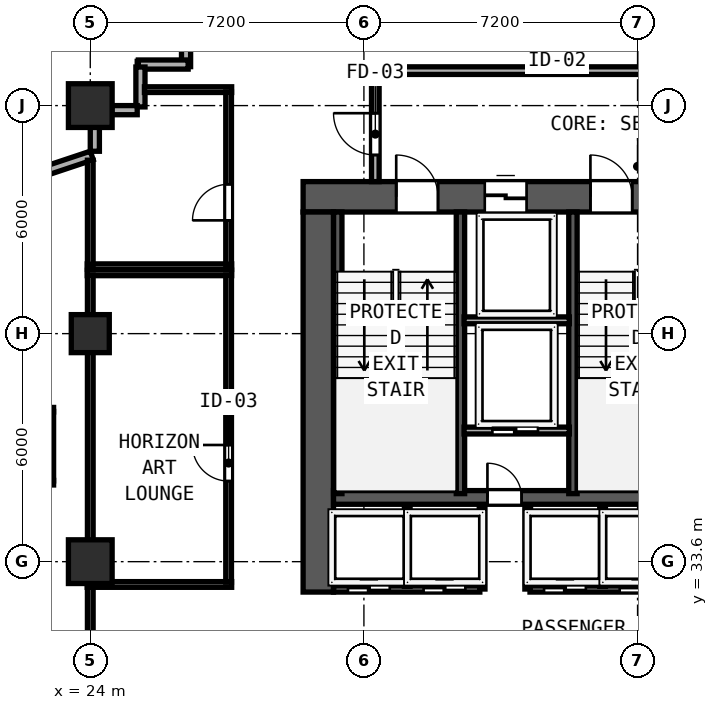
"""IFC4 building model, lengths in metres.
Left out: names, types, materials, properties, quantities, classifications, styles, units other than length and angle.
Written with IfcOpenShell. Run it as: python <this file> out.ifc"""

import sys

from ifc_helpers import new_model, si_unit, direction, frame, frame_2d, origin, origin_2d, place, context, subcontext, project, spatial, rectangle, hollow_rectangle, extrude, element, fill, save


model = new_model("IFC4")
c1 = context("Model", 3, precision=1e-05, world=origin(), true_north=direction((0.0, 1.0)))
c2 = subcontext(c1, "Body", "Model", "MODEL_VIEW")
j1 = project(units=[si_unit("LENGTHUNIT", "METRE"), si_unit("PLANEANGLEUNIT", "RADIAN")], contexts=[c1])
p1 = place(None, origin())
s1 = spatial("IfcSite", under=j1, at=p1, CompositionType="ELEMENT")
p2 = place(p1, origin())
s2 = spatial("IfcBuilding", under=s1, at=p2, CompositionType="ELEMENT")
p3 = place(p2, frame((0.0, 0.0, 47.6)))
s3 = spatial("IfcBuildingStorey", under=s2, at=p3, CompositionType="ELEMENT", Elevation=47.6)
p4 = place(p3, frame((29.6, 43.2, 0.0), z_axis=(0.0, 0.0, 1.0), x_axis=(1.0, 0.0, 0.0)))
e1 = element("IfcWall", 1, at=p4, inside=s3, PredefinedType="SHEAR", context=c2, shape_type="SweptSolid", body=[
    extrude(rectangle(XDim=17.6, YDim=0.8, at=frame_2d((8.8, 0.0))), origin(), (0.0, 0.0, 1.0), 3.6),
])
p5 = place(p4, frame((2.45, 0.0, 0.0)))
e2 = element("IfcOpeningElement", 2, at=p5, cuts=e1, PredefinedType="OPENING", context=c2, shape_type="SweptSolid", body=[
    extrude(rectangle(XDim=1.1, YDim=2.15, at=frame_2d((0.55, 1.075))), frame((0.0, 0.41, 0.0), z_axis=(0.0, -1.0, 0.0), x_axis=(1.0, 0.0, 0.0)), (0.0, 0.0, 1.0), 0.82),
])
p6 = place(p4, frame((7.56, 0.0, 0.0)))
e3 = element("IfcOpeningElement", 3, at=p6, cuts=e1, PredefinedType="OPENING", context=c2, shape_type="SweptSolid", body=[
    extrude(rectangle(XDim=1.1, YDim=2.15, at=frame_2d((0.55, 1.075))), frame((0.0, 0.41, 0.0), z_axis=(0.0, -1.0, 0.0), x_axis=(1.0, 0.0, 0.0)), (0.0, 0.0, 1.0), 0.82),
])
p7 = place(p4, frame((13.65, 0.0, 0.0)))
e4 = element("IfcOpeningElement", 4, at=p7, cuts=e1, PredefinedType="OPENING", context=c2, shape_type="SweptSolid", body=[
    extrude(rectangle(XDim=1.1, YDim=2.15, at=frame_2d((0.55, 1.075))), frame((0.0, 0.41, 0.0), z_axis=(0.0, -1.0, 0.0), x_axis=(1.0, 0.0, 0.0)), (0.0, 0.0, 1.0), 0.82),
])
p8 = place(p4, frame((4.78, 0.0, 0.0)))
e5 = element("IfcOpeningElement", 5, at=p8, cuts=e1, PredefinedType="OPENING", context=c2, shape_type="SweptSolid", body=[
    extrude(rectangle(XDim=1.1, YDim=2.2, at=frame_2d((0.55, 1.1))), frame((0.0, 0.41, 0.0), z_axis=(0.0, -1.0, 0.0), x_axis=(1.0, 0.0, 0.0)), (0.0, 0.0, 1.0), 0.82),
])
p9 = place(p4, frame((11.14, 0.0, 0.0)))
e6 = element("IfcOpeningElement", 6, at=p9, cuts=e1, PredefinedType="OPENING", context=c2, shape_type="SweptSolid", body=[
    extrude(rectangle(XDim=1.1, YDim=2.2, at=frame_2d((0.55, 1.1))), frame((0.0, 0.41, 0.0), z_axis=(0.0, -1.0, 0.0), x_axis=(1.0, 0.0, 0.0)), (0.0, 0.0, 1.0), 0.82),
])
p10 = place(p3, frame((30.0, 32.8, 0.0), z_axis=(0.0, 0.0, 1.0), x_axis=(0.0, 1.0, 0.0)))
e7 = element("IfcWall", 7, at=p10, inside=s3, PredefinedType="SHEAR", context=c2, shape_type="SweptSolid", body=[
    extrude(rectangle(XDim=10.0, YDim=0.8, at=frame_2d((5.0, 0.0))), origin(), (0.0, 0.0, 1.0), 3.6),
])
p11 = place(p3, frame((30.4, 35.29, 0.0), z_axis=(0.0, 0.0, 1.0), x_axis=(1.0, 0.0, 0.0)))
e8 = element("IfcWall", 8, at=p11, inside=s3, PredefinedType="SHEAR", context=c2, shape_type="SweptSolid", body=[
    extrude(rectangle(XDim=16.0, YDim=0.36, at=frame_2d((8.0, 0.0))), origin(), (0.0, 0.0, 1.0), 3.6),
])
p12 = place(p11, frame((4.95, 0.0, 0.0), z_axis=(0.0, 0.0, 1.0), x_axis=(-1.0, 0.0, 0.0)))
e9 = element("IfcOpeningElement", 9, at=p12, cuts=e8, PredefinedType="OPENING", context=c2, shape_type="SweptSolid", body=[
    extrude(rectangle(XDim=0.9, YDim=2.1, at=frame_2d((0.45, 1.05))), frame((0.0, 0.19, 0.0), z_axis=(0.0, -1.0, 0.0), x_axis=(1.0, 0.0, 0.0)), (0.0, 0.0, 1.0), 0.38),
])
p13 = place(p11, frame((12.01, 0.0, 0.0), z_axis=(0.0, 0.0, 1.0), x_axis=(-1.0, 0.0, 0.0)))
e10 = element("IfcOpeningElement", 10, at=p13, cuts=e8, PredefinedType="OPENING", context=c2, shape_type="SweptSolid", body=[
    extrude(rectangle(XDim=0.9, YDim=2.1, at=frame_2d((0.45, 1.05))), frame((0.0, 0.19, 0.0), z_axis=(0.0, -1.0, 0.0), x_axis=(1.0, 0.0, 0.0)), (0.0, 0.0, 1.0), 0.38),
])
for number, where, z_axis, x_axis in (
    (11, (30.512, 35.39, 0.0), (0.0, 0.0, 1.0), (0.0, 1.0, 0.0)),
    (12, (33.74, 35.39, 0.0), (0.0, 0.0, 1.0), (0.0, 1.0, 0.0)),
    (13, (36.7, 35.39, 0.0), (0.0, 0.0, 1.0), (0.0, 1.0, 0.0)),
):
    element("IfcWall", number, at=place(p3, frame(where, z_axis=z_axis, x_axis=x_axis)), inside=s3, PredefinedType="SHEAR", context=c2, shape_type="SweptSolid", body=[
        extrude(rectangle(XDim=7.41, YDim=0.22, at=frame_2d((3.705, 0.0))), origin(), (0.0, 0.0, 1.0), 3.6),
    ])
for number, where, z_axis, x_axis in (
    (14, (24.0, 33.6, 0.0), (0.0, 0.0, 1.0), (1.0, 0.0, 0.0)),
    (15, (24.0, 45.6, 0.0), (0.0, 0.0, 1.0), (1.0, 0.0, 0.0)),
):
    element("IfcColumn", number, at=place(p3, frame(where, z_axis=z_axis, x_axis=x_axis)), inside=s3, PredefinedType="COLUMN", context=c2, shape_type="SweptSolid", body=[
        extrude(hollow_rectangle(XDim=1.15, YDim=1.15, WallThickness=0.042, at=origin_2d()), origin(), (0.0, 0.0, 1.0), 3.8),
    ])
p14 = place(p3, frame((24.0, 39.6, 0.0), z_axis=(0.0, 0.0, 1.0), x_axis=(1.0, 0.0, 0.0)))
e16 = element("IfcColumn", 16, at=p14, inside=s3, PredefinedType="COLUMN", context=c2, shape_type="SweptSolid", body=[
    extrude(hollow_rectangle(XDim=1.0, YDim=1.0, WallThickness=0.038, at=origin_2d()), origin(), (0.0, 0.0, 1.0), 3.8),
])
p15 = place(p3, frame((26.52, 47.995, 0.0), z_axis=(0.0, 0.0, 1.0), x_axis=(0.0, -1.0, 0.0)))
e17 = element("IfcWall", 17, at=p15, inside=s3, PredefinedType="SOLIDWALL", context=c2, shape_type="SweptSolid", body=[
    extrude(rectangle(XDim=1.37, YDim=0.24, at=frame_2d((0.685, 0.0))), origin(), (0.0, 0.0, 1.0), 3.6),
])
p16 = place(p3, frame((26.575, 46.68, 0.0), z_axis=(0.0, 0.0, 1.0), x_axis=(-1.0, 0.0, 0.0)))
e18 = element("IfcWall", 18, at=p16, inside=s3, PredefinedType="SOLIDWALL", context=c2, shape_type="SweptSolid", body=[
    extrude(rectangle(XDim=1.31, YDim=0.24, at=frame_2d((0.655, 0.0))), origin(), (0.0, 0.0, 1.0), 3.6),
])
p17 = place(p3, frame((25.32, 46.615, 0.0), z_axis=(0.0, 0.0, 1.0), x_axis=(0.0, -1.0, 0.0)))
e19 = element("IfcWall", 19, at=p17, inside=s3, PredefinedType="SOLIDWALL", context=c2, shape_type="SweptSolid", body=[
    extrude(rectangle(XDim=1.05, YDim=0.24, at=frame_2d((0.525, 0.0))), origin(), (0.0, 0.0, 1.0), 3.6),
])
p18 = place(p3, frame((25.235, 45.48, 0.0), z_axis=(0.0, 0.0, 1.0), x_axis=(-1.0, 0.0, 0.0)))
e20 = element("IfcWall", 20, at=p18, inside=s3, PredefinedType="SOLIDWALL", context=c2, shape_type="SweptSolid", body=[
    extrude(rectangle(XDim=0.668, YDim=0.24, at=frame_2d((0.334, 0.0))), origin(), (0.0, 0.0, 1.0), 3.6),
])
p19 = place(p3, frame((24.12, 45.033, 0.0), z_axis=(0.0, 0.0, 1.0), x_axis=(0.0, -1.0, 0.0)))
e21 = element("IfcWall", 21, at=p19, inside=s3, PredefinedType="SOLIDWALL", context=c2, shape_type="SweptSolid", body=[
    extrude(rectangle(XDim=0.635, YDim=0.24, at=frame_2d((0.317, 0.0))), origin(), (0.0, 0.0, 1.0), 3.097),
])
p20 = place(p3, frame((24.039, 44.287, 0.0), z_axis=(0.0, 0.0, 1.0), x_axis=(-0.948678995954, -0.316240672014, 0.0)))
e22 = element("IfcWall", 22, at=p20, inside=s3, PredefinedType="SOLIDWALL", context=c2, shape_type="SweptSolid", body=[
    extrude(rectangle(XDim=5.675, YDim=0.24, at=frame_2d((2.837, 0.0))), origin(), (0.0, 0.0, 1.0), 3.097),
])
p21 = place(p20, frame((1.6, 0.0, 0.85)))
e23 = element("IfcOpeningElement", 23, at=p21, cuts=e22, PredefinedType="OPENING", context=c2, shape_type="SweptSolid", body=[
    extrude(rectangle(XDim=1.2, YDim=1.85, at=frame_2d((0.6, 0.925))), frame((0.0, 0.13, 0.0), z_axis=(0.0, -1.0, 0.0), x_axis=(1.0, 0.0, 0.0)), (0.0, 0.0, 1.0), 0.26),
])
p22 = place(p3, frame((31.5, 46.52, 0.0), z_axis=(0.0, 0.0, 1.0), x_axis=(1.0, 0.0, 0.0)))
e24 = element("IfcWall", 24, at=p22, inside=s3, PredefinedType="SOLIDWALL", context=c2, shape_type="SweptSolid", body=[
    extrude(rectangle(XDim=13.8, YDim=0.2, at=frame_2d((6.9, 0.0))), origin(), (0.0, 0.0, 1.0), 3.6),
])
p23 = place(p3, frame((31.5, 43.6, 0.0), z_axis=(0.0, 0.0, 1.0), x_axis=(0.0, 1.0, 0.0)))
e25 = element("IfcWall", 25, at=p23, inside=s3, PredefinedType="SOLIDWALL", context=c2, shape_type="SweptSolid", body=[
    extrude(rectangle(XDim=2.835, YDim=0.2, at=frame_2d((1.417, 0.0))), origin(), (0.0, 0.0, 1.0), 3.6),
])
p24 = place(p23, frame((1.8, 0.0, 0.0), z_axis=(0.0, 0.0, 1.0), x_axis=(-1.0, 0.0, 0.0)))
e26 = element("IfcOpeningElement", 26, at=p24, cuts=e25, PredefinedType="OPENING", context=c2, shape_type="SweptSolid", body=[
    extrude(rectangle(XDim=1.1, YDim=2.15, at=frame_2d((0.55, 1.075))), frame((0.0, 0.11, 0.0), z_axis=(0.0, -1.0, 0.0), x_axis=(1.0, 0.0, 0.0)), (0.0, 0.0, 1.0), 0.22),
])
p25 = place(p3, frame((33.835, 39.95, 0.0), z_axis=(0.0, 0.0, 1.0), x_axis=(1.0, 0.0, 0.0)))
e27 = element("IfcWall", 27, at=p25, inside=s3, PredefinedType="SOLIDWALL", context=c2, shape_type="SweptSolid", body=[
    extrude(rectangle(XDim=2.77, YDim=0.18, at=frame_2d((1.385, 0.0))), origin(), (0.0, 0.0, 1.0), 3.6),
])
p26 = place(p3, frame((33.835, 37.05, 0.0), z_axis=(0.0, 0.0, 1.0), x_axis=(1.0, 0.0, 0.0)))
e28 = element("IfcWall", 28, at=p26, inside=s3, PredefinedType="SOLIDWALL", context=c2, shape_type="SweptSolid", body=[
    extrude(rectangle(XDim=2.77, YDim=0.18, at=frame_2d((1.385, 0.0))), origin(), (0.0, 0.0, 1.0), 3.6),
])
p27 = place(p26, frame((1.945, 0.0, 0.0), z_axis=(0.0, 0.0, 1.0), x_axis=(-1.0, 0.0, 0.0)))
e29 = element("IfcOpeningElement", 29, at=p27, cuts=e28, PredefinedType="OPENING", context=c2, shape_type="SweptSolid", body=[
    extrude(rectangle(XDim=1.2, YDim=2.2, at=frame_2d((0.6, 1.1))), frame((0.0, 0.1, 0.0), z_axis=(0.0, -1.0, 0.0), x_axis=(1.0, 0.0, 0.0)), (0.0, 0.0, 1.0), 0.2),
])
for number, where, z_axis, x_axis in (
    (30, (34.31, 32.88, 0.0), (0.0, 0.0, 1.0), (0.0, 1.0, 0.0)),
    (31, (35.51, 32.88, 0.0), (0.0, 0.0, 1.0), (0.0, 1.0, 0.0)),
):
    element("IfcWall", number, at=place(p3, frame(where, z_axis=z_axis, x_axis=x_axis)), inside=s3, PredefinedType="SOLIDWALL", context=c2, shape_type="SweptSolid", body=[
        extrude(rectangle(XDim=2.17, YDim=0.15, at=frame_2d((1.085, 0.0))), origin(), (0.0, 0.0, 1.0), 3.6),
    ])
p28 = place(p3, frame((30.4, 32.88, 0.0), z_axis=(0.0, 0.0, 1.0), x_axis=(1.0, 0.0, 0.0)))
e32 = element("IfcWall", 32, at=p28, inside=s3, PredefinedType="SOLIDWALL", context=c2, shape_type="SweptSolid", body=[
    extrude(rectangle(XDim=3.85, YDim=0.16, at=frame_2d((1.925, 0.0))), origin(), (0.0, 0.0, 1.0), 3.6),
])
p29 = place(p28, frame((1.48, 0.0, 0.0), z_axis=(0.0, 0.0, 1.0), x_axis=(-1.0, 0.0, 0.0)))
e33 = element("IfcOpeningElement", 33, at=p29, cuts=e32, PredefinedType="OPENING", context=c2, shape_type="SweptSolid", body=[
    extrude(rectangle(XDim=1.1, YDim=2.2, at=frame_2d((0.55, 1.1))), frame((0.0, 0.09, 0.0), z_axis=(0.0, -1.0, 0.0), x_axis=(1.0, 0.0, 0.0)), (0.0, 0.0, 1.0), 0.18),
])
p30 = place(p28, frame((3.47, 0.0, 0.0), z_axis=(0.0, 0.0, 1.0), x_axis=(-1.0, 0.0, 0.0)))
e34 = element("IfcOpeningElement", 34, at=p30, cuts=e32, PredefinedType="OPENING", context=c2, shape_type="SweptSolid", body=[
    extrude(rectangle(XDim=1.1, YDim=2.2, at=frame_2d((0.55, 1.1))), frame((0.0, 0.09, 0.0), z_axis=(0.0, -1.0, 0.0), x_axis=(1.0, 0.0, 0.0)), (0.0, 0.0, 1.0), 0.18),
])
p31 = place(p3, frame((35.57, 32.88, 0.0), z_axis=(0.0, 0.0, 1.0), x_axis=(1.0, 0.0, 0.0)))
e35 = element("IfcWall", 35, at=p31, inside=s3, PredefinedType="SOLIDWALL", context=c2, shape_type="SweptSolid", body=[
    extrude(rectangle(XDim=5.74, YDim=0.16, at=frame_2d((2.87, 0.0))), origin(), (0.0, 0.0, 1.0), 3.6),
])
p32 = place(p31, frame((1.47, 0.0, 0.0), z_axis=(0.0, 0.0, 1.0), x_axis=(-1.0, 0.0, 0.0)))
e36 = element("IfcOpeningElement", 36, at=p32, cuts=e35, PredefinedType="OPENING", context=c2, shape_type="SweptSolid", body=[
    extrude(rectangle(XDim=1.1, YDim=2.2, at=frame_2d((0.55, 1.1))), frame((0.0, 0.09, 0.0), z_axis=(0.0, -1.0, 0.0), x_axis=(1.0, 0.0, 0.0)), (0.0, 0.0, 1.0), 0.18),
])
p33 = place(p31, frame((3.46, 0.0, 0.0), z_axis=(0.0, 0.0, 1.0), x_axis=(-1.0, 0.0, 0.0)))
e37 = element("IfcOpeningElement", 37, at=p33, cuts=e35, PredefinedType="OPENING", context=c2, shape_type="SweptSolid", body=[
    extrude(rectangle(XDim=1.1, YDim=2.2, at=frame_2d((0.55, 1.1))), frame((0.0, 0.09, 0.0), z_axis=(0.0, -1.0, 0.0), x_axis=(1.0, 0.0, 0.0)), (0.0, 0.0, 1.0), 0.18),
])
for number, where, z_axis, x_axis in (
    (38, (32.34, 32.95, 0.0), (0.0, 0.0, 1.0), (0.0, 1.0, 0.0)),
    (39, (37.48, 32.95, 0.0), (0.0, 0.0, 1.0), (0.0, 1.0, 0.0)),
):
    element("IfcWall", number, at=place(p3, frame(where, z_axis=z_axis, x_axis=x_axis)), inside=s3, PredefinedType="SOLIDWALL", context=c2, shape_type="SweptSolid", body=[
        extrude(rectangle(XDim=2.05, YDim=0.15, at=frame_2d((1.025, 0.0))), origin(), (0.0, 0.0, 1.0), 3.6),
    ])
for number, where, z_axis, x_axis in (
    (40, (23.92, 41.2, 0.0), (0.0, 0.0, 1.0), (1.0, 0.0, 0.0)),
    (41, (23.92, 33.0, 0.0), (0.0, 0.0, 1.0), (1.0, 0.0, 0.0)),
):
    element("IfcWall", number, at=place(p3, frame(where, z_axis=z_axis, x_axis=x_axis)), inside=s3, PredefinedType="PARTITIONING", context=c2, shape_type="SweptSolid", body=[
        extrude(rectangle(XDim=3.8, YDim=0.15, at=frame_2d((1.9, 0.0))), origin(), (0.0, 0.0, 1.0), 3.6),
    ])
p34 = place(p3, frame((24.0, 33.06, 0.0), z_axis=(0.0, 0.0, 1.0), x_axis=(0.0, 1.0, 0.0)))
e42 = element("IfcWall", 42, at=p34, inside=s3, PredefinedType="PARTITIONING", context=c2, shape_type="SweptSolid", body=[
    extrude(rectangle(XDim=8.08, YDim=0.15, at=frame_2d((4.04, 0.0))), origin(), (0.0, 0.0, 1.0), 3.097),
])
p35 = place(p3, frame((27.64, 33.06, 0.0), z_axis=(0.0, 0.0, 1.0), x_axis=(0.0, 1.0, 0.0)))
e43 = element("IfcWall", 43, at=p35, inside=s3, PredefinedType="PARTITIONING", context=c2, shape_type="SweptSolid", body=[
    extrude(rectangle(XDim=8.08, YDim=0.15, at=frame_2d((4.04, 0.0))), origin(), (0.0, 0.0, 1.0), 3.6),
])
p36 = place(p35, frame((3.61, 0.0, 0.0), z_axis=(0.0, 0.0, 1.0), x_axis=(-1.0, 0.0, 0.0)))
e44 = element("IfcOpeningElement", 44, at=p36, cuts=e43, PredefinedType="OPENING", context=c2, shape_type="SweptSolid", body=[
    extrude(rectangle(XDim=0.95, YDim=2.12, at=frame_2d((0.475, 1.06))), frame((0.0, 0.085, 0.0), z_axis=(0.0, -1.0, 0.0), x_axis=(1.0, 0.0, 0.0)), (0.0, 0.0, 1.0), 0.17),
])
p37 = place(p3, frame((25.425, 46.02, 0.0), z_axis=(0.0, 0.0, 1.0), x_axis=(1.0, 0.0, 0.0)))
e45 = element("IfcWall", 45, at=p37, inside=s3, PredefinedType="PARTITIONING", context=c2, shape_type="SweptSolid", body=[
    extrude(rectangle(XDim=2.295, YDim=0.15, at=frame_2d((1.147, 0.0))), origin(), (0.0, 0.0, 1.0), 3.6),
])
p38 = place(p3, frame((23.92, 41.36, 0.0), z_axis=(0.0, 0.0, 1.0), x_axis=(1.0, 0.0, 0.0)))
e46 = element("IfcWall", 46, at=p38, inside=s3, PredefinedType="PARTITIONING", context=c2, shape_type="SweptSolid", body=[
    extrude(rectangle(XDim=3.8, YDim=0.15, at=frame_2d((1.9, 0.0))), origin(), (0.0, 0.0, 1.0), 3.6),
])
p39 = place(p3, frame((24.0, 41.42, 0.0), z_axis=(0.0, 0.0, 1.0), x_axis=(0.0, 1.0, 0.0)))
e47 = element("IfcWall", 47, at=p39, inside=s3, PredefinedType="PARTITIONING", context=c2, shape_type="SweptSolid", body=[
    extrude(rectangle(XDim=2.743, YDim=0.15, at=frame_2d((1.372, 0.0))), origin(), (0.0, 0.0, 1.0), 3.097),
])
p40 = place(p3, frame((27.64, 41.42, 0.0), z_axis=(0.0, 0.0, 1.0), x_axis=(0.0, 1.0, 0.0)))
e48 = element("IfcWall", 48, at=p40, inside=s3, PredefinedType="PARTITIONING", context=c2, shape_type="SweptSolid", body=[
    extrude(rectangle(XDim=4.54, YDim=0.15, at=frame_2d((2.27, 0.0))), origin(), (0.0, 0.0, 1.0), 3.6),
])
p41 = place(p40, frame((2.11, 0.0, 0.0), z_axis=(0.0, 0.0, 1.0), x_axis=(-1.0, 0.0, 0.0)))
e49 = element("IfcOpeningElement", 49, at=p41, cuts=e48, PredefinedType="OPENING", context=c2, shape_type="SweptSolid", body=[
    extrude(rectangle(XDim=0.95, YDim=2.12, at=frame_2d((0.475, 1.06))), frame((0.0, 0.085, 0.0), z_axis=(0.0, -1.0, 0.0), x_axis=(1.0, 0.0, 0.0)), (0.0, 0.0, 1.0), 0.17),
])
p42 = place(p3, frame((24.0, 26.34, 0.0), z_axis=(0.0, 0.0, 1.0), x_axis=(0.0, 1.0, 0.0)))
e50 = element("IfcWall", 50, at=p42, inside=s3, PredefinedType="PARTITIONING", context=c2, shape_type="SweptSolid", body=[
    extrude(rectangle(XDim=6.6, YDim=0.15, at=frame_2d((3.3, 0.0))), origin(), (0.0, 0.0, 1.0), 3.097),
])
p43 = place(p3, frame((20.935, 37.598, 0.0), z_axis=(0.0, 0.0, 1.0), x_axis=(1.0, 0.0, 0.0)))
e51 = element("IfcWall", 51, at=p43, inside=s3, PredefinedType="PARTITIONING", context=c2, shape_type="SweptSolid", body=[
    extrude(rectangle(XDim=2.1, YDim=0.12, at=frame_2d((1.05, 0.0))), origin(), (0.0, 0.0, 1.0), 3.6),
])
p44 = place(p3, frame((20.935, 35.678, 0.0), z_axis=(0.0, 0.0, 1.0), x_axis=(1.0, 0.0, 0.0)))
e52 = element("IfcWall", 52, at=p44, inside=s3, PredefinedType="PARTITIONING", context=c2, shape_type="SweptSolid", body=[
    extrude(rectangle(XDim=2.1, YDim=0.12, at=frame_2d((1.05, 0.0))), origin(), (0.0, 0.0, 1.0), 3.6),
])
p45 = place(p44, frame((0.625, 0.0, 0.0)))
e53 = element("IfcOpeningElement", 53, at=p45, cuts=e52, PredefinedType="OPENING", context=c2, shape_type="SweptSolid", body=[
    extrude(rectangle(XDim=0.85, YDim=2.1, at=frame_2d((0.425, 1.05))), frame((0.0, 0.07, 0.0), z_axis=(0.0, -1.0, 0.0), x_axis=(1.0, 0.0, 0.0)), (0.0, 0.0, 1.0), 0.14),
])
p46 = place(p3, frame((22.975, 35.723, 0.0), z_axis=(0.0, 0.0, 1.0), x_axis=(0.0, 1.0, 0.0)))
e54 = element("IfcWall", 54, at=p46, inside=s3, PredefinedType="PARTITIONING", context=c2, shape_type="SweptSolid", body=[
    extrude(rectangle(XDim=1.83, YDim=0.12, at=frame_2d((0.915, 0.0))), origin(), (0.0, 0.0, 1.0), 3.6),
])
p47 = place(p5, origin())
e55 = element("IfcDoor", 55, at=p47, inside=s3, OperationType="SINGLE_SWING_LEFT", PredefinedType="DOOR", context=c2, shape_type="SweptSolid", body=[
    extrude(rectangle(XDim=1.1, YDim=2.15, at=frame_2d((0.55, 1.075))), frame((0.0, 0.185, 0.0), z_axis=(0.0, -1.0, 0.0), x_axis=(1.0, 0.0, 0.0)), (0.0, 0.0, 1.0), 0.05),
])
fill(e2, e55)
p48 = place(p6, origin())
e56 = element("IfcDoor", 56, at=p48, inside=s3, OperationType="SINGLE_SWING_LEFT", PredefinedType="DOOR", context=c2, shape_type="SweptSolid", body=[
    extrude(rectangle(XDim=1.1, YDim=2.15, at=frame_2d((0.55, 1.075))), frame((0.0, 0.185, 0.0), z_axis=(0.0, -1.0, 0.0), x_axis=(1.0, 0.0, 0.0)), (0.0, 0.0, 1.0), 0.05),
])
fill(e3, e56)
p49 = place(p24, origin())
e57 = element("IfcDoor", 57, at=p49, inside=s3, OperationType="SINGLE_SWING_LEFT", PredefinedType="DOOR", context=c2, shape_type="SweptSolid", body=[
    extrude(rectangle(XDim=1.1, YDim=2.15, at=frame_2d((0.55, 1.075))), frame((0.0, 0.025, 0.0), z_axis=(0.0, -1.0, 0.0), x_axis=(1.0, 0.0, 0.0)), (0.0, 0.0, 1.0), 0.05),
])
fill(e26, e57)
p50 = place(p8, origin())
e58 = element("IfcDoor", 58, at=p50, inside=s3, OperationType="SLIDING_TO_LEFT", PredefinedType="DOOR", context=c2, shape_type="SweptSolid", body=[
    extrude(rectangle(XDim=1.1, YDim=2.2, at=frame_2d((0.55, 1.1))), frame((0.0, 0.185, 0.0), z_axis=(0.0, -1.0, 0.0), x_axis=(1.0, 0.0, 0.0)), (0.0, 0.0, 1.0), 0.05),
])
fill(e5, e58)
p51 = place(p27, origin())
e59 = element("IfcDoor", 59, at=p51, inside=s3, OperationType="SLIDING_TO_RIGHT", PredefinedType="DOOR", context=c2, shape_type="SweptSolid", body=[
    extrude(rectangle(XDim=1.2, YDim=2.2, at=frame_2d((0.6, 1.1))), frame((0.0, 0.025, 0.0), z_axis=(0.0, -1.0, 0.0), x_axis=(1.0, 0.0, 0.0)), (0.0, 0.0, 1.0), 0.05),
])
fill(e29, e59)
p52 = place(p12, origin())
e60 = element("IfcDoor", 60, at=p52, inside=s3, OperationType="SINGLE_SWING_RIGHT", PredefinedType="DOOR", context=c2, shape_type="SweptSolid", body=[
    extrude(rectangle(XDim=0.9, YDim=2.1, at=frame_2d((0.45, 1.05))), frame((0.0, 0.025, 0.0), z_axis=(0.0, -1.0, 0.0), x_axis=(1.0, 0.0, 0.0)), (0.0, 0.0, 1.0), 0.05),
])
fill(e9, e60)
p53 = place(p29, origin())
e61 = element("IfcDoor", 61, at=p53, inside=s3, OperationType="SLIDING_TO_LEFT", PredefinedType="DOOR", context=c2, shape_type="SweptSolid", body=[
    extrude(rectangle(XDim=1.1, YDim=2.2, at=frame_2d((0.55, 1.1))), frame((0.0, 0.025, 0.0), z_axis=(0.0, -1.0, 0.0), x_axis=(1.0, 0.0, 0.0)), (0.0, 0.0, 1.0), 0.05),
])
fill(e33, e61)
p54 = place(p30, origin())
e62 = element("IfcDoor", 62, at=p54, inside=s3, OperationType="SLIDING_TO_LEFT", PredefinedType="DOOR", context=c2, shape_type="SweptSolid", body=[
    extrude(rectangle(XDim=1.1, YDim=2.2, at=frame_2d((0.55, 1.1))), frame((0.0, 0.025, 0.0), z_axis=(0.0, -1.0, 0.0), x_axis=(1.0, 0.0, 0.0)), (0.0, 0.0, 1.0), 0.05),
])
fill(e34, e62)
p55 = place(p32, origin())
e63 = element("IfcDoor", 63, at=p55, inside=s3, OperationType="SLIDING_TO_LEFT", PredefinedType="DOOR", context=c2, shape_type="SweptSolid", body=[
    extrude(rectangle(XDim=1.1, YDim=2.2, at=frame_2d((0.55, 1.1))), frame((0.0, 0.025, 0.0), z_axis=(0.0, -1.0, 0.0), x_axis=(1.0, 0.0, 0.0)), (0.0, 0.0, 1.0), 0.05),
])
fill(e36, e63)
p56 = place(p33, origin())
e64 = element("IfcDoor", 64, at=p56, inside=s3, OperationType="SLIDING_TO_LEFT", PredefinedType="DOOR", context=c2, shape_type="SweptSolid", body=[
    extrude(rectangle(XDim=1.1, YDim=2.2, at=frame_2d((0.55, 1.1))), frame((0.0, 0.025, 0.0), z_axis=(0.0, -1.0, 0.0), x_axis=(1.0, 0.0, 0.0)), (0.0, 0.0, 1.0), 0.05),
])
fill(e37, e64)
p57 = place(p36, origin())
e65 = element("IfcDoor", 65, at=p57, inside=s3, OperationType="SINGLE_SWING_LEFT", PredefinedType="DOOR", context=c2, shape_type="SweptSolid", body=[
    extrude(rectangle(XDim=0.95, YDim=2.12, at=frame_2d((0.475, 1.06))), frame((0.0, 0.025, 0.0), z_axis=(0.0, -1.0, 0.0), x_axis=(1.0, 0.0, 0.0)), (0.0, 0.0, 1.0), 0.05),
])
fill(e44, e65)
p58 = place(p41, origin())
e66 = element("IfcDoor", 66, at=p58, inside=s3, OperationType="SINGLE_SWING_RIGHT", PredefinedType="DOOR", context=c2, shape_type="SweptSolid", body=[
    extrude(rectangle(XDim=0.95, YDim=2.12, at=frame_2d((0.475, 1.06))), frame((0.0, 0.025, 0.0), z_axis=(0.0, -1.0, 0.0), x_axis=(1.0, 0.0, 0.0)), (0.0, 0.0, 1.0), 0.05),
])
fill(e49, e66)
save(model, sys.argv[1])
